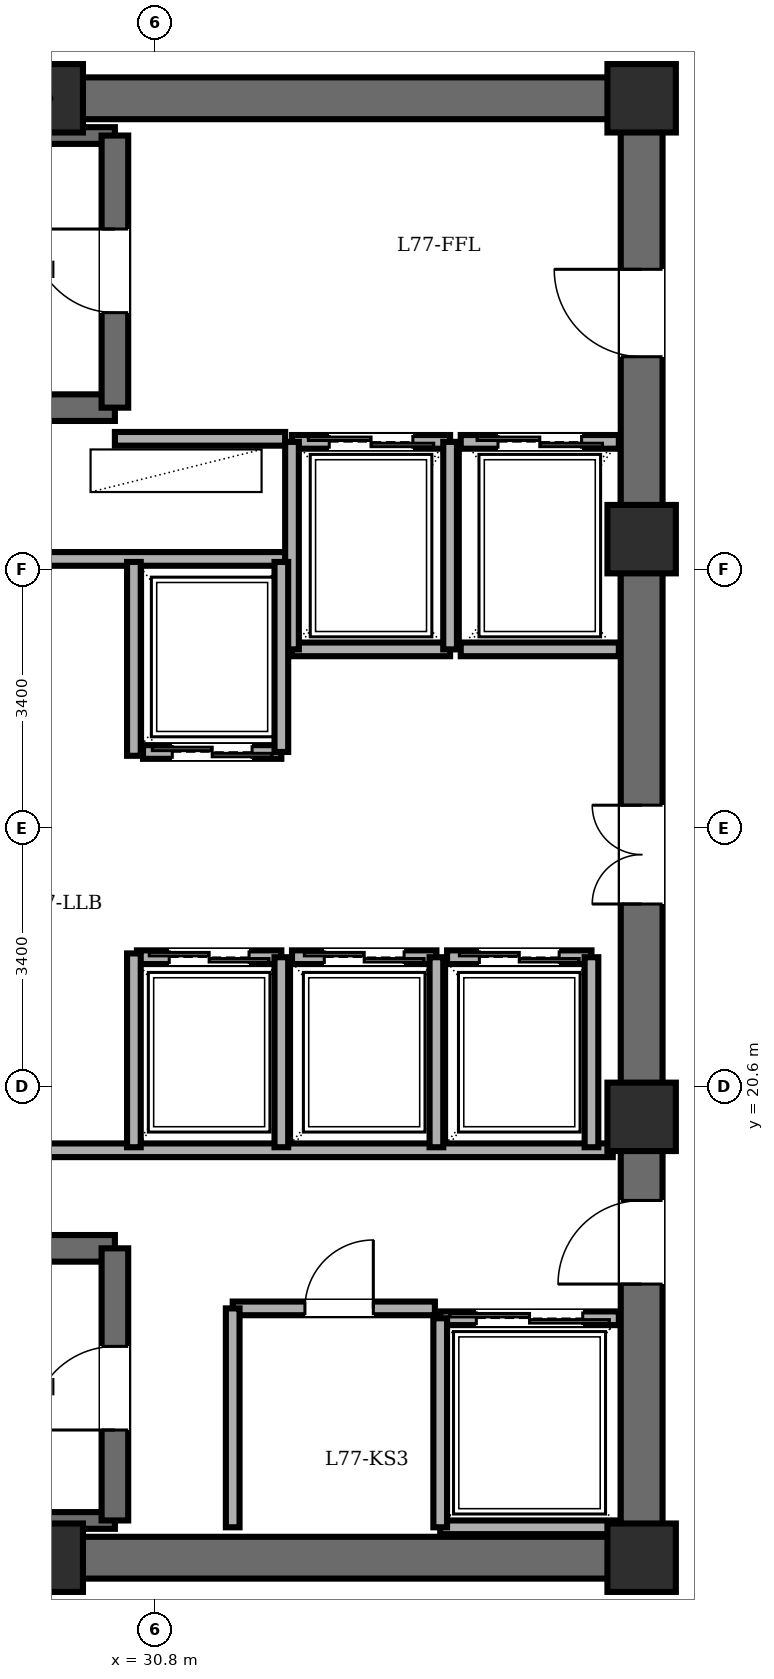
"""IFC4 building model, lengths in metres.
Left out: names, types, materials, properties, quantities, classifications, styles, units other than length and angle.
Written with IfcOpenShell. Run it as: python <this file> out.ifc"""

import sys

from ifc_helpers import new_model, si_unit, direction, frame, frame_2d, origin, origin_2d, place, context, subcontext, project, spatial, rectangle, extrude, element, fill, save


model = new_model("IFC4")
c1 = context("Model", 3, precision=1e-05, world=origin(), true_north=direction((0.0, 1.0)))
c2 = subcontext(c1, "Body", "Model", "MODEL_VIEW")
j1 = project(units=[si_unit("LENGTHUNIT", "METRE"), si_unit("PLANEANGLEUNIT", "RADIAN")], contexts=[c1])
p1 = place(None, origin())
s1 = spatial("IfcSite", under=j1, at=p1, CompositionType="ELEMENT")
p2 = place(p1, origin())
s2 = spatial("IfcBuilding", under=s1, at=p2, CompositionType="ELEMENT")
p3 = place(p2, frame((0.0, 0.0, 295.3)))
s3 = spatial("IfcBuildingStorey", under=s2, at=p3, CompositionType="ELEMENT", Elevation=295.3)
for number, where, z_axis, x_axis in (
    (1, (29.4, 14.4, 0.0), (0.0, 0.0, 1.0), (1.0, 0.0, 0.0)),
    (2, (37.2, 14.4, 0.0), (0.0, 0.0, 1.0), (1.0, 0.0, 0.0)),
    (3, (37.2, 20.2, 0.0), (0.0, 0.0, 1.0), (1.0, 0.0, 0.0)),
    (4, (37.2, 27.8, 0.0), (0.0, 0.0, 1.0), (1.0, 0.0, 0.0)),
    (5, (37.2, 33.6, 0.0), (0.0, 0.0, 1.0), (1.0, 0.0, 0.0)),
    (6, (29.4, 33.6, 0.0), (0.0, 0.0, 1.0), (1.0, 0.0, 0.0)),
):
    element("IfcColumn", number, at=place(p3, frame(where, z_axis=z_axis, x_axis=x_axis)), inside=s3, PredefinedType="COLUMN", context=c2, shape_type="SweptSolid", body=[
        extrude(rectangle(XDim=0.9, YDim=0.9, at=origin_2d()), origin(), (0.0, 0.0, 1.0), 5.1),
    ])
for number, where, z_axis, x_axis in (
    (7, (21.6, 33.6, 0.0), (0.0, 0.0, 1.0), (1.0, 0.0, 0.0)),
    (8, (37.2, 14.4, 0.0), (0.0, 0.0, 1.0), (-1.0, 0.0, 0.0)),
):
    element("IfcWall", number, at=place(p3, frame(where, z_axis=z_axis, x_axis=x_axis)), inside=s3, PredefinedType="SHEAR", context=c2, shape_type="SweptSolid", body=[
        extrude(rectangle(XDim=15.6, YDim=0.55, at=frame_2d((7.8, 0.0))), origin(), (0.0, 0.0, 1.0), 4.85),
    ])
p4 = place(p3, frame((37.2, 14.4, 0.0), z_axis=(0.0, 0.0, 1.0), x_axis=(0.0, 1.0, 0.0)))
e9 = element("IfcWall", 9, at=p4, inside=s3, PredefinedType="SHEAR", context=c2, shape_type="SweptSolid", body=[
    extrude(rectangle(XDim=19.2, YDim=0.55, at=frame_2d((9.6, 0.0))), origin(), (0.0, 0.0, 1.0), 4.85),
])
p5 = place(p4, frame((15.8, 0.0, 0.0)))
e10 = element("IfcOpeningElement", 10, at=p5, cuts=e9, PredefinedType="OPENING", context=c2, shape_type="SweptSolid", body=[
    extrude(rectangle(XDim=1.15, YDim=2.15, at=frame_2d((0.575, 1.075))), frame((0.0, 0.285, 0.0), z_axis=(0.0, -1.0, 0.0), x_axis=(1.0, 0.0, 0.0)), (0.0, 0.0, 1.0), 0.57),
])
p6 = place(p4, frame((3.6, 0.0, 0.0)))
e11 = element("IfcOpeningElement", 11, at=p6, cuts=e9, PredefinedType="OPENING", context=c2, shape_type="SweptSolid", body=[
    extrude(rectangle(XDim=1.1, YDim=2.15, at=frame_2d((0.55, 1.075))), frame((0.0, 0.285, 0.0), z_axis=(0.0, -1.0, 0.0), x_axis=(1.0, 0.0, 0.0)), (0.0, 0.0, 1.0), 0.57),
])
p7 = place(p4, frame((8.6, 0.0, 0.0)))
e12 = element("IfcOpeningElement", 12, at=p7, cuts=e9, PredefinedType="OPENING", context=c2, shape_type="SweptSolid", body=[
    extrude(rectangle(XDim=1.3, YDim=2.2, at=frame_2d((0.65, 1.1))), frame((0.0, 0.285, 0.0), z_axis=(0.0, -1.0, 0.0), x_axis=(1.0, 0.0, 0.0)), (0.0, 0.0, 1.0), 0.57),
])
p8 = place(p3, frame((22.48, 29.53, 0.0), z_axis=(0.0, 0.0, 1.0), x_axis=(1.0, 0.0, 0.0)))
e13 = element("IfcWall", 13, at=p8, inside=s3, PredefinedType="SOLIDWALL", context=c2, shape_type="SweptSolid", body=[
    extrude(rectangle(XDim=7.79, YDim=0.35, at=frame_2d((3.895, 0.0))), origin(), (0.0, 0.0, 1.0), 4.85),
])
p9 = place(p3, frame((22.48, 33.11, 0.0), z_axis=(0.0, 0.0, 1.0), x_axis=(1.0, 0.0, 0.0)))
e14 = element("IfcWall", 14, at=p9, inside=s3, PredefinedType="PARTITIONING", context=c2, shape_type="SweptSolid", body=[
    extrude(rectangle(XDim=7.79, YDim=0.22, at=frame_2d((3.895, 0.0))), origin(), (0.0, 0.0, 1.0), 4.85),
])
p10 = place(p3, frame((30.27, 29.53, 0.0), z_axis=(0.0, 0.0, 1.0), x_axis=(0.0, 1.0, 0.0)))
e15 = element("IfcWall", 15, at=p10, inside=s3, PredefinedType="SOLIDWALL", context=c2, shape_type="SweptSolid", body=[
    extrude(rectangle(XDim=3.58, YDim=0.35, at=frame_2d((1.79, 0.0))), origin(), (0.0, 0.0, 1.0), 4.85),
])
p11 = place(p10, frame((1.25, 0.0, 0.0)))
e16 = element("IfcOpeningElement", 16, at=p11, cuts=e15, PredefinedType="OPENING", context=c2, shape_type="SweptSolid", body=[
    extrude(rectangle(XDim=1.1, YDim=2.15, at=frame_2d((0.55, 1.075))), frame((0.0, 0.185, 0.0), z_axis=(0.0, -1.0, 0.0), x_axis=(1.0, 0.0, 0.0)), (0.0, 0.0, 1.0), 0.37),
])
p12 = place(p3, frame((22.48, 18.47, 0.0), z_axis=(0.0, 0.0, 1.0), x_axis=(1.0, 0.0, 0.0)))
e17 = element("IfcWall", 17, at=p12, inside=s3, PredefinedType="SOLIDWALL", context=c2, shape_type="SweptSolid", body=[
    extrude(rectangle(XDim=7.79, YDim=0.35, at=frame_2d((3.895, 0.0))), origin(), (0.0, 0.0, 1.0), 4.85),
])
p13 = place(p3, frame((22.48, 14.89, 0.0), z_axis=(0.0, 0.0, 1.0), x_axis=(1.0, 0.0, 0.0)))
e18 = element("IfcWall", 18, at=p13, inside=s3, PredefinedType="PARTITIONING", context=c2, shape_type="SweptSolid", body=[
    extrude(rectangle(XDim=7.79, YDim=0.22, at=frame_2d((3.895, 0.0))), origin(), (0.0, 0.0, 1.0), 4.85),
])
p14 = place(p3, frame((30.27, 14.89, 0.0), z_axis=(0.0, 0.0, 1.0), x_axis=(0.0, 1.0, 0.0)))
e19 = element("IfcWall", 19, at=p14, inside=s3, PredefinedType="SOLIDWALL", context=c2, shape_type="SweptSolid", body=[
    extrude(rectangle(XDim=3.58, YDim=0.35, at=frame_2d((1.79, 0.0))), origin(), (0.0, 0.0, 1.0), 4.85),
])
p15 = place(p14, frame((1.19, 0.0, 0.0)))
e20 = element("IfcOpeningElement", 20, at=p15, cuts=e19, PredefinedType="OPENING", context=c2, shape_type="SweptSolid", body=[
    extrude(rectangle(XDim=1.1, YDim=2.15, at=frame_2d((0.55, 1.075))), frame((0.0, 0.185, 0.0), z_axis=(0.0, -1.0, 0.0), x_axis=(1.0, 0.0, 0.0)), (0.0, 0.0, 1.0), 0.37),
])
p16 = place(p3, frame((30.27, 29.12, 0.0), z_axis=(0.0, 0.0, 1.0), x_axis=(1.0, 0.0, 0.0)))
e21 = element("IfcWall", 21, at=p16, inside=s3, PredefinedType="PARTITIONING", context=c2, shape_type="SweptSolid", body=[
    extrude(rectangle(XDim=2.24, YDim=0.18, at=frame_2d((1.12, 0.0))), origin(), (0.0, 0.0, 1.0), 4.85),
])
p17 = place(p3, frame((21.95, 27.54, 0.0), z_axis=(0.0, 0.0, 1.0), x_axis=(1.0, 0.0, 0.0)))
e22 = element("IfcWall", 22, at=p17, inside=s3, PredefinedType="PARTITIONING", context=c2, shape_type="SweptSolid", body=[
    extrude(rectangle(XDim=10.56, YDim=0.18, at=frame_2d((5.28, 0.0))), origin(), (0.0, 0.0, 1.0), 4.85),
])
p18 = place(p3, frame((21.95, 19.76, 0.0), z_axis=(0.0, 0.0, 1.0), x_axis=(1.0, 0.0, 0.0)))
e23 = element("IfcWall", 23, at=p18, inside=s3, PredefinedType="PARTITIONING", context=c2, shape_type="SweptSolid", body=[
    extrude(rectangle(XDim=14.87, YDim=0.18, at=frame_2d((7.435, 0.0))), origin(), (0.0, 0.0, 1.0), 4.85),
])
p19 = place(p3, frame((31.82, 17.68, 0.0), z_axis=(0.0, 0.0, 1.0), x_axis=(1.0, 0.0, 0.0)))
e24 = element("IfcWall", 24, at=p19, inside=s3, PredefinedType="PARTITIONING", context=c2, shape_type="SweptSolid", body=[
    extrude(rectangle(XDim=2.66, YDim=0.18, at=frame_2d((1.33, 0.0))), origin(), (0.0, 0.0, 1.0), 4.85),
])
p20 = place(p19, frame((0.95, 0.0, 0.0)))
e25 = element("IfcOpeningElement", 25, at=p20, cuts=e24, PredefinedType="OPENING", context=c2, shape_type="SweptSolid", body=[
    extrude(rectangle(XDim=0.9, YDim=2.05, at=frame_2d((0.45, 1.025))), frame((0.0, 0.1, 0.0), z_axis=(0.0, -1.0, 0.0), x_axis=(1.0, 0.0, 0.0)), (0.0, 0.0, 1.0), 0.2),
])
p21 = place(p3, frame((31.82, 14.8, 0.0), z_axis=(0.0, 0.0, 1.0), x_axis=(0.0, 1.0, 0.0)))
e26 = element("IfcWall", 26, at=p21, inside=s3, PredefinedType="PARTITIONING", context=c2, shape_type="SweptSolid", body=[
    extrude(rectangle(XDim=2.88, YDim=0.18, at=frame_2d((1.44, 0.0))), origin(), (0.0, 0.0, 1.0), 4.85),
])
p22 = place(p3, frame((32.6, 29.08, 0.0), z_axis=(0.0, 0.0, 1.0), x_axis=(1.0, 0.0, 0.0)))
e27 = element("IfcWall", 27, at=p22, inside=s3, PredefinedType="PARTITIONING", context=c2, shape_type="SweptSolid", body=[
    extrude(rectangle(XDim=2.08, YDim=0.18, at=frame_2d((1.04, 0.0))), origin(), (0.0, 0.0, 1.0), 4.85),
])
p23 = place(p22, frame((0.49, 0.0, 0.0)))
e28 = element("IfcOpeningElement", 28, at=p23, cuts=e27, PredefinedType="OPENING", context=c2, shape_type="SweptSolid", body=[
    extrude(rectangle(XDim=1.1, YDim=2.2, at=frame_2d((0.55, 1.1))), frame((0.0, 0.1, 0.0), z_axis=(0.0, -1.0, 0.0), x_axis=(1.0, 0.0, 0.0)), (0.0, 0.0, 1.0), 0.2),
])
p24 = place(p3, frame((34.68, 26.35, 0.0), z_axis=(0.0, 0.0, 1.0), x_axis=(-1.0, 0.0, 0.0)))
e29 = element("IfcWall", 29, at=p24, inside=s3, PredefinedType="PARTITIONING", context=c2, shape_type="SweptSolid", body=[
    extrude(rectangle(XDim=2.08, YDim=0.18, at=frame_2d((1.04, 0.0))), origin(), (0.0, 0.0, 1.0), 4.85),
])
for number, where, z_axis, x_axis in (
    (30, (34.68, 26.35, 0.0), (0.0, 0.0, 1.0), (0.0, 1.0, 0.0)),
    (31, (32.6, 29.08, 0.0), (0.0, 0.0, 1.0), (0.0, -1.0, 0.0)),
):
    element("IfcWall", number, at=place(p3, frame(where, z_axis=z_axis, x_axis=x_axis)), inside=s3, PredefinedType="PARTITIONING", context=c2, shape_type="SweptSolid", body=[
        extrude(rectangle(XDim=2.73, YDim=0.18, at=frame_2d((1.365, 0.0))), origin(), (0.0, 0.0, 1.0), 4.85),
    ])
p25 = place(p3, frame((34.82, 29.08, 0.0), z_axis=(0.0, 0.0, 1.0), x_axis=(1.0, 0.0, 0.0)))
e32 = element("IfcWall", 32, at=p25, inside=s3, PredefinedType="PARTITIONING", context=c2, shape_type="SweptSolid", body=[
    extrude(rectangle(XDim=2.08, YDim=0.18, at=frame_2d((1.04, 0.0))), origin(), (0.0, 0.0, 1.0), 4.85),
])
p26 = place(p25, frame((0.49, 0.0, 0.0)))
e33 = element("IfcOpeningElement", 33, at=p26, cuts=e32, PredefinedType="OPENING", context=c2, shape_type="SweptSolid", body=[
    extrude(rectangle(XDim=1.1, YDim=2.2, at=frame_2d((0.55, 1.1))), frame((0.0, 0.1, 0.0), z_axis=(0.0, -1.0, 0.0), x_axis=(1.0, 0.0, 0.0)), (0.0, 0.0, 1.0), 0.2),
])
p27 = place(p3, frame((36.9, 26.35, 0.0), z_axis=(0.0, 0.0, 1.0), x_axis=(-1.0, 0.0, 0.0)))
e34 = element("IfcWall", 34, at=p27, inside=s3, PredefinedType="PARTITIONING", context=c2, shape_type="SweptSolid", body=[
    extrude(rectangle(XDim=2.08, YDim=0.18, at=frame_2d((1.04, 0.0))), origin(), (0.0, 0.0, 1.0), 4.85),
])
p28 = place(p3, frame((34.55, 17.55, 0.0), z_axis=(0.0, 0.0, 1.0), x_axis=(1.0, 0.0, 0.0)))
e35 = element("IfcWall", 35, at=p28, inside=s3, PredefinedType="PARTITIONING", context=c2, shape_type="SweptSolid", body=[
    extrude(rectangle(XDim=2.35, YDim=0.18, at=frame_2d((1.175, 0.0))), origin(), (0.0, 0.0, 1.0), 4.85),
])
p29 = place(p28, frame((0.475, 0.0, 0.0)))
e36 = element("IfcOpeningElement", 36, at=p29, cuts=e35, PredefinedType="OPENING", context=c2, shape_type="SweptSolid", body=[
    extrude(rectangle(XDim=1.4, YDim=2.3, at=frame_2d((0.7, 1.15))), frame((0.0, 0.1, 0.0), z_axis=(0.0, -1.0, 0.0), x_axis=(1.0, 0.0, 0.0)), (0.0, 0.0, 1.0), 0.2),
])
p30 = place(p3, frame((36.9, 14.8, 0.0), z_axis=(0.0, 0.0, 1.0), x_axis=(-1.0, 0.0, 0.0)))
e37 = element("IfcWall", 37, at=p30, inside=s3, PredefinedType="PARTITIONING", context=c2, shape_type="SweptSolid", body=[
    extrude(rectangle(XDim=2.35, YDim=0.18, at=frame_2d((1.175, 0.0))), origin(), (0.0, 0.0, 1.0), 3.332),
])
p31 = place(p3, frame((34.55, 17.55, 0.0), z_axis=(0.0, 0.0, 1.0), x_axis=(0.0, -1.0, 0.0)))
e38 = element("IfcWall", 38, at=p31, inside=s3, PredefinedType="PARTITIONING", context=c2, shape_type="SweptSolid", body=[
    extrude(rectangle(XDim=2.75, YDim=0.18, at=frame_2d((1.375, 0.0))), origin(), (0.0, 0.0, 1.0), 4.85),
])
p32 = place(p3, frame((32.46, 25.0, 0.0), z_axis=(0.0, 0.0, 1.0), x_axis=(-1.0, 0.0, 0.0)))
e39 = element("IfcWall", 39, at=p32, inside=s3, PredefinedType="PARTITIONING", context=c2, shape_type="SweptSolid", body=[
    extrude(rectangle(XDim=1.82, YDim=0.18, at=frame_2d((0.91, 0.0))), origin(), (0.0, 0.0, 1.0), 4.85),
])
p33 = place(p32, frame((0.385, 0.0, 0.0)))
e40 = element("IfcOpeningElement", 40, at=p33, cuts=e39, PredefinedType="OPENING", context=c2, shape_type="SweptSolid", body=[
    extrude(rectangle(XDim=1.05, YDim=2.2, at=frame_2d((0.525, 1.1))), frame((0.0, 0.1, 0.0), z_axis=(0.0, -1.0, 0.0), x_axis=(1.0, 0.0, 0.0)), (0.0, 0.0, 1.0), 0.2),
])
p34 = place(p3, frame((32.46, 25.0, 0.0), z_axis=(0.0, 0.0, 1.0), x_axis=(0.0, 1.0, 0.0)))
e41 = element("IfcWall", 41, at=p34, inside=s3, PredefinedType="PARTITIONING", context=c2, shape_type="SweptSolid", body=[
    extrude(rectangle(XDim=2.5, YDim=0.18, at=frame_2d((1.25, 0.0))), origin(), (0.0, 0.0, 1.0), 4.85),
])
p35 = place(p3, frame((30.56, 22.3, 0.0), z_axis=(0.0, 0.0, 1.0), x_axis=(1.0, 0.0, 0.0)))
e42 = element("IfcWall", 42, at=p35, inside=s3, PredefinedType="PARTITIONING", context=c2, shape_type="SweptSolid", body=[
    extrude(rectangle(XDim=1.9, YDim=0.18, at=frame_2d((0.95, 0.0))), origin(), (0.0, 0.0, 1.0), 4.85),
])
p36 = place(p35, frame((0.425, 0.0, 0.0)))
e43 = element("IfcOpeningElement", 43, at=p36, cuts=e42, PredefinedType="OPENING", context=c2, shape_type="SweptSolid", body=[
    extrude(rectangle(XDim=1.05, YDim=2.2, at=frame_2d((0.525, 1.1))), frame((0.0, 0.1, 0.0), z_axis=(0.0, -1.0, 0.0), x_axis=(1.0, 0.0, 0.0)), (0.0, 0.0, 1.0), 0.2),
])
p37 = place(p3, frame((32.46, 19.8, 0.0), z_axis=(0.0, 0.0, 1.0), x_axis=(0.0, 1.0, 0.0)))
e44 = element("IfcWall", 44, at=p37, inside=s3, PredefinedType="PARTITIONING", context=c2, shape_type="SweptSolid", body=[
    extrude(rectangle(XDim=2.5, YDim=0.18, at=frame_2d((1.25, 0.0))), origin(), (0.0, 0.0, 1.0), 4.85),
])
p38 = place(p3, frame((32.6, 22.3, 0.0), z_axis=(0.0, 0.0, 1.0), x_axis=(1.0, 0.0, 0.0)))
e45 = element("IfcWall", 45, at=p38, inside=s3, PredefinedType="PARTITIONING", context=c2, shape_type="SweptSolid", body=[
    extrude(rectangle(XDim=1.9, YDim=0.18, at=frame_2d((0.95, 0.0))), origin(), (0.0, 0.0, 1.0), 4.85),
])
p39 = place(p38, frame((0.425, 0.0, 0.0)))
e46 = element("IfcOpeningElement", 46, at=p39, cuts=e45, PredefinedType="OPENING", context=c2, shape_type="SweptSolid", body=[
    extrude(rectangle(XDim=1.05, YDim=2.2, at=frame_2d((0.525, 1.1))), frame((0.0, 0.1, 0.0), z_axis=(0.0, -1.0, 0.0), x_axis=(1.0, 0.0, 0.0)), (0.0, 0.0, 1.0), 0.2),
])
p40 = place(p3, frame((34.5, 19.8, 0.0), z_axis=(0.0, 0.0, 1.0), x_axis=(0.0, 1.0, 0.0)))
e47 = element("IfcWall", 47, at=p40, inside=s3, PredefinedType="PARTITIONING", context=c2, shape_type="SweptSolid", body=[
    extrude(rectangle(XDim=2.5, YDim=0.18, at=frame_2d((1.25, 0.0))), origin(), (0.0, 0.0, 1.0), 4.85),
])
p41 = place(p3, frame((34.64, 22.3, 0.0), z_axis=(0.0, 0.0, 1.0), x_axis=(1.0, 0.0, 0.0)))
e48 = element("IfcWall", 48, at=p41, inside=s3, PredefinedType="PARTITIONING", context=c2, shape_type="SweptSolid", body=[
    extrude(rectangle(XDim=1.9, YDim=0.18, at=frame_2d((0.95, 0.0))), origin(), (0.0, 0.0, 1.0), 4.85),
])
p42 = place(p41, frame((0.425, 0.0, 0.0)))
e49 = element("IfcOpeningElement", 49, at=p42, cuts=e48, PredefinedType="OPENING", context=c2, shape_type="SweptSolid", body=[
    extrude(rectangle(XDim=1.05, YDim=2.2, at=frame_2d((0.525, 1.1))), frame((0.0, 0.1, 0.0), z_axis=(0.0, -1.0, 0.0), x_axis=(1.0, 0.0, 0.0)), (0.0, 0.0, 1.0), 0.2),
])
p43 = place(p3, frame((36.54, 19.8, 0.0), z_axis=(0.0, 0.0, 1.0), x_axis=(0.0, 1.0, 0.0)))
e50 = element("IfcWall", 50, at=p43, inside=s3, PredefinedType="PARTITIONING", context=c2, shape_type="SweptSolid", body=[
    extrude(rectangle(XDim=2.5, YDim=0.18, at=frame_2d((1.25, 0.0))), origin(), (0.0, 0.0, 1.0), 4.85),
])
for number, where, z_axis, x_axis in (
    (51, (30.52, 24.95, 0.0), (0.0, 0.0, 1.0), (0.0, 1.0, 0.0)),
    (52, (30.52, 19.8, 0.0), (0.0, 0.0, 1.0), (0.0, 1.0, 0.0)),
):
    element("IfcWall", number, at=place(p3, frame(where, z_axis=z_axis, x_axis=x_axis)), inside=s3, PredefinedType="PARTITIONING", context=c2, shape_type="SweptSolid", body=[
        extrude(rectangle(XDim=2.55, YDim=0.18, at=frame_2d((1.275, 0.0))), origin(), (0.0, 0.0, 1.0), 4.85),
    ])
p44 = place(p11, origin())
e53 = element("IfcDoor", 53, at=p44, inside=s3, OperationType="SINGLE_SWING_RIGHT", PredefinedType="DOOR", context=c2, shape_type="SweptSolid", body=[
    extrude(rectangle(XDim=1.1, YDim=2.15, at=frame_2d((0.55, 1.075))), frame((0.0, 0.025, 0.0), z_axis=(0.0, -1.0, 0.0), x_axis=(1.0, 0.0, 0.0)), (0.0, 0.0, 1.0), 0.05),
])
fill(e16, e53)
p45 = place(p15, origin())
e54 = element("IfcDoor", 54, at=p45, inside=s3, OperationType="SINGLE_SWING_LEFT", PredefinedType="DOOR", context=c2, shape_type="SweptSolid", body=[
    extrude(rectangle(XDim=1.1, YDim=2.15, at=frame_2d((0.55, 1.075))), frame((0.0, 0.025, 0.0), z_axis=(0.0, -1.0, 0.0), x_axis=(1.0, 0.0, 0.0)), (0.0, 0.0, 1.0), 0.05),
])
fill(e20, e54)
p46 = place(p5, origin())
e55 = element("IfcDoor", 55, at=p46, inside=s3, OperationType="SINGLE_SWING_RIGHT", PredefinedType="DOOR", context=c2, shape_type="SweptSolid", body=[
    extrude(rectangle(XDim=1.15, YDim=2.15, at=frame_2d((0.575, 1.075))), frame((0.0, 0.025, 0.0), z_axis=(0.0, -1.0, 0.0), x_axis=(1.0, 0.0, 0.0)), (0.0, 0.0, 1.0), 0.05),
])
fill(e10, e55)
p47 = place(p6, origin())
e56 = element("IfcDoor", 56, at=p47, inside=s3, OperationType="SINGLE_SWING_LEFT", PredefinedType="DOOR", context=c2, shape_type="SweptSolid", body=[
    extrude(rectangle(XDim=1.1, YDim=2.15, at=frame_2d((0.55, 1.075))), frame((0.0, 0.025, 0.0), z_axis=(0.0, -1.0, 0.0), x_axis=(1.0, 0.0, 0.0)), (0.0, 0.0, 1.0), 0.05),
])
fill(e11, e56)
p48 = place(p20, origin())
e57 = element("IfcDoor", 57, at=p48, inside=s3, OperationType="SINGLE_SWING_RIGHT", PredefinedType="DOOR", context=c2, shape_type="SweptSolid", body=[
    extrude(rectangle(XDim=0.9, YDim=2.05, at=frame_2d((0.45, 1.025))), frame((0.0, 0.025, 0.0), z_axis=(0.0, -1.0, 0.0), x_axis=(1.0, 0.0, 0.0)), (0.0, 0.0, 1.0), 0.05),
])
fill(e25, e57)
p49 = place(p23, origin())
e58 = element("IfcDoor", 58, at=p49, inside=s3, OperationType="DOUBLE_DOOR_SLIDING", PredefinedType="DOOR", context=c2, shape_type="SweptSolid", body=[
    extrude(rectangle(XDim=1.1, YDim=2.2, at=frame_2d((0.55, 1.1))), frame((0.0, 0.025, 0.0), z_axis=(0.0, -1.0, 0.0), x_axis=(1.0, 0.0, 0.0)), (0.0, 0.0, 1.0), 0.05),
])
fill(e28, e58)
p50 = place(p26, origin())
e59 = element("IfcDoor", 59, at=p50, inside=s3, OperationType="DOUBLE_DOOR_SLIDING", PredefinedType="DOOR", context=c2, shape_type="SweptSolid", body=[
    extrude(rectangle(XDim=1.1, YDim=2.2, at=frame_2d((0.55, 1.1))), frame((0.0, 0.025, 0.0), z_axis=(0.0, -1.0, 0.0), x_axis=(1.0, 0.0, 0.0)), (0.0, 0.0, 1.0), 0.05),
])
fill(e33, e59)
p51 = place(p29, origin())
e60 = element("IfcDoor", 60, at=p51, inside=s3, OperationType="DOUBLE_DOOR_SLIDING", PredefinedType="DOOR", context=c2, shape_type="SweptSolid", body=[
    extrude(rectangle(XDim=1.4, YDim=2.3, at=frame_2d((0.7, 1.15))), frame((0.0, 0.025, 0.0), z_axis=(0.0, -1.0, 0.0), x_axis=(1.0, 0.0, 0.0)), (0.0, 0.0, 1.0), 0.05),
])
fill(e36, e60)
p52 = place(p33, origin())
e61 = element("IfcDoor", 61, at=p52, inside=s3, OperationType="DOUBLE_DOOR_SLIDING", PredefinedType="DOOR", context=c2, shape_type="SweptSolid", body=[
    extrude(rectangle(XDim=1.05, YDim=2.2, at=frame_2d((0.525, 1.1))), frame((0.0, 0.025, 0.0), z_axis=(0.0, -1.0, 0.0), x_axis=(1.0, 0.0, 0.0)), (0.0, 0.0, 1.0), 0.05),
])
fill(e40, e61)
p53 = place(p36, origin())
e62 = element("IfcDoor", 62, at=p53, inside=s3, OperationType="DOUBLE_DOOR_SLIDING", PredefinedType="DOOR", context=c2, shape_type="SweptSolid", body=[
    extrude(rectangle(XDim=1.05, YDim=2.2, at=frame_2d((0.525, 1.1))), frame((0.0, 0.025, 0.0), z_axis=(0.0, -1.0, 0.0), x_axis=(1.0, 0.0, 0.0)), (0.0, 0.0, 1.0), 0.05),
])
fill(e43, e62)
p54 = place(p39, origin())
e63 = element("IfcDoor", 63, at=p54, inside=s3, OperationType="DOUBLE_DOOR_SLIDING", PredefinedType="DOOR", context=c2, shape_type="SweptSolid", body=[
    extrude(rectangle(XDim=1.05, YDim=2.2, at=frame_2d((0.525, 1.1))), frame((0.0, 0.025, 0.0), z_axis=(0.0, -1.0, 0.0), x_axis=(1.0, 0.0, 0.0)), (0.0, 0.0, 1.0), 0.05),
])
fill(e46, e63)
p55 = place(p42, origin())
e64 = element("IfcDoor", 64, at=p55, inside=s3, OperationType="DOUBLE_DOOR_SLIDING", PredefinedType="DOOR", context=c2, shape_type="SweptSolid", body=[
    extrude(rectangle(XDim=1.05, YDim=2.2, at=frame_2d((0.525, 1.1))), frame((0.0, 0.025, 0.0), z_axis=(0.0, -1.0, 0.0), x_axis=(1.0, 0.0, 0.0)), (0.0, 0.0, 1.0), 0.05),
])
fill(e49, e64)
p56 = place(p7, origin())
e65 = element("IfcDoor", 65, at=p56, inside=s3, OperationType="DOUBLE_DOOR_SINGLE_SWING", PredefinedType="DOOR", context=c2, shape_type="SweptSolid", body=[
    extrude(rectangle(XDim=1.3, YDim=2.2, at=frame_2d((0.65, 1.1))), frame((0.0, 0.025, 0.0), z_axis=(0.0, -1.0, 0.0), x_axis=(1.0, 0.0, 0.0)), (0.0, 0.0, 1.0), 0.05),
])
fill(e12, e65)
save(model, sys.argv[1])
